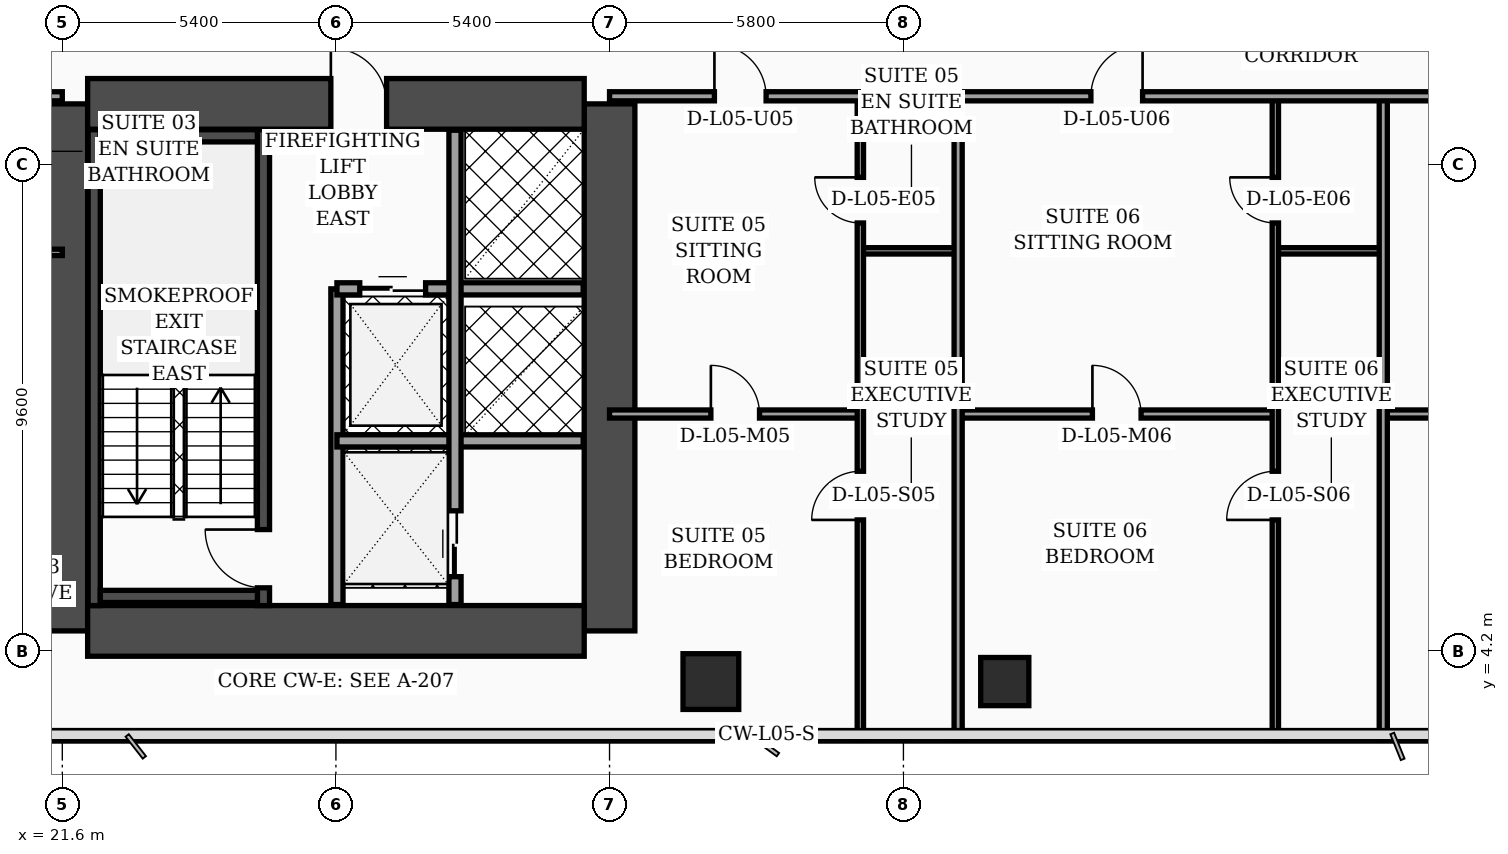
"""IFC4 building model, lengths in metres.
Left out: names, types, materials, properties, quantities, classifications, styles, units other than length and angle.
Written with IfcOpenShell. Run it as: python <this file> out.ifc"""

import sys

from ifc_helpers import new_model, si_unit, direction, frame, frame_2d, origin, origin_2d, place, context, subcontext, project, spatial, rectangle, hollow_rectangle, extrude, element, fill, save


model = new_model("IFC4")
c1 = context("Model", 3, precision=1e-05, world=origin(), true_north=direction((0.0, 1.0)))
c2 = subcontext(c1, "Body", "Model", "MODEL_VIEW")
j1 = project(units=[si_unit("LENGTHUNIT", "METRE"), si_unit("PLANEANGLEUNIT", "RADIAN")], contexts=[c1])
p1 = place(None, origin())
s1 = spatial("IfcSite", under=j1, at=p1, CompositionType="ELEMENT")
p2 = place(p1, origin())
s2 = spatial("IfcBuilding", under=s1, at=p2, CompositionType="ELEMENT")
p3 = place(p2, frame((0.0, 0.0, 27.0)))
s3 = spatial("IfcBuildingStorey", under=s2, at=p3, CompositionType="ELEMENT", Elevation=27.0)
for number, where, z_axis, x_axis in (
    (1, (21.6, 4.6, 0.0), (0.0, 0.0, 1.0), (0.0, 1.0, 0.0)),
    (2, (32.4, 4.6, 0.0), (0.0, 0.0, 1.0), (0.0, 1.0, 0.0)),
):
    element("IfcWall", number, at=place(p3, frame(where, z_axis=z_axis, x_axis=x_axis)), inside=s3, PredefinedType="SHEAR", context=c2, shape_type="SweptSolid", body=[
        extrude(rectangle(XDim=10.4, YDim=1.0, at=frame_2d((5.2, 0.0))), origin(), (0.0, 0.0, 1.0), 3.56),
    ])
p4 = place(p3, frame((22.1, 15.0, 0.0), z_axis=(0.0, 0.0, 1.0), x_axis=(1.0, 0.0, 0.0)))
e3 = element("IfcWall", 3, at=p4, inside=s3, PredefinedType="SHEAR", context=c2, shape_type="SweptSolid", body=[
    extrude(rectangle(XDim=9.8, YDim=1.0, at=frame_2d((4.9, 0.0))), origin(), (0.0, 0.0, 1.0), 3.56),
])
p5 = place(p4, frame((4.8, 0.0, 0.0)))
e4 = element("IfcOpeningElement", 4, at=p5, cuts=e3, PredefinedType="OPENING", context=c2, shape_type="SweptSolid", body=[
    extrude(rectangle(XDim=1.1, YDim=2.2, at=frame_2d((0.55, 1.1))), frame((0.0, 0.51, 0.0), z_axis=(0.0, -1.0, 0.0), x_axis=(1.0, 0.0, 0.0)), (0.0, 0.0, 1.0), 1.02),
])
p6 = place(p3, frame((22.1, 4.6, 0.0), z_axis=(0.0, 0.0, 1.0), x_axis=(1.0, 0.0, 0.0)))
e5 = element("IfcWall", 5, at=p6, inside=s3, PredefinedType="SHEAR", context=c2, shape_type="SweptSolid", body=[
    extrude(rectangle(XDim=9.8, YDim=1.0, at=frame_2d((4.9, 0.0))), origin(), (0.0, 0.0, 1.0), 3.56),
])
p7 = place(p3, frame((22.23, 5.1, 0.0), z_axis=(0.0, 0.0, 1.0), x_axis=(0.0, 1.0, 0.0)))
e6 = element("IfcWall", 6, at=p7, inside=s3, PredefinedType="SOLIDWALL", context=c2, shape_type="SweptSolid", body=[
    extrude(rectangle(XDim=9.39, YDim=0.24, at=frame_2d((4.695, 0.0))), origin(), (0.0, 0.0, 1.0), 3.56),
])
p8 = place(p3, frame((25.57, 5.1, 0.0), z_axis=(0.0, 0.0, 1.0), x_axis=(0.0, 1.0, 0.0)))
e7 = element("IfcWall", 7, at=p8, inside=s3, PredefinedType="SOLIDWALL", context=c2, shape_type="SweptSolid", body=[
    extrude(rectangle(XDim=9.39, YDim=0.24, at=frame_2d((4.695, 0.0))), origin(), (0.0, 0.0, 1.0), 3.56),
])
p9 = place(p8, frame((0.35, 0.0, 0.0)))
e8 = element("IfcOpeningElement", 8, at=p9, cuts=e7, PredefinedType="OPENING", context=c2, shape_type="SweptSolid", body=[
    extrude(rectangle(XDim=1.15, YDim=2.2, at=frame_2d((0.575, 1.1))), frame((0.0, 0.13, 0.0), z_axis=(0.0, -1.0, 0.0), x_axis=(1.0, 0.0, 0.0)), (0.0, 0.0, 1.0), 0.26),
])
for number, where, z_axis, x_axis in (
    (9, (22.35, 5.28, 0.0), (0.0, 0.0, 1.0), (1.0, 0.0, 0.0)),
    (10, (22.35, 14.37, 0.0), (0.0, 0.0, 1.0), (1.0, 0.0, 0.0)),
):
    element("IfcWall", number, at=place(p3, frame(where, z_axis=z_axis, x_axis=x_axis)), inside=s3, PredefinedType="SOLIDWALL", context=c2, shape_type="SweptSolid", body=[
        extrude(rectangle(XDim=3.1, YDim=0.24, at=frame_2d((1.55, 0.0))), origin(), (0.0, 0.0, 1.0), 3.56),
    ])
p10 = place(p3, frame((34.4, 3.6, 0.0), z_axis=(0.0, 0.0, 1.0), x_axis=(1.0, 0.0, 0.0)))
e11 = element("IfcColumn", 11, at=p10, inside=s3, PredefinedType="COLUMN", context=c2, shape_type="SweptSolid", body=[
    extrude(hollow_rectangle(XDim=1.1, YDim=1.1, WallThickness=0.045, at=origin_2d()), origin(), (0.0, 0.0, 1.0), 3.56),
])
p11 = place(p3, frame((40.2, 3.6, 0.0), z_axis=(0.0, 0.0, 1.0), x_axis=(1.0, 0.0, 0.0)))
e12 = element("IfcColumn", 12, at=p11, inside=s3, PredefinedType="COLUMN", context=c2, shape_type="SweptSolid", body=[
    extrude(hollow_rectangle(XDim=0.95, YDim=0.95, WallThickness=0.04, at=origin_2d()), origin(), (0.0, 0.0, 1.0), 3.56),
])
p12 = place(p3, frame((27.02, 5.12, 0.0), z_axis=(0.0, 0.0, 1.0), x_axis=(0.0, 1.0, 0.0)))
e13 = element("IfcWall", 13, at=p12, inside=s3, PredefinedType="SOLIDWALL", context=c2, shape_type="SweptSolid", body=[
    extrude(rectangle(XDim=6.23, YDim=0.24, at=frame_2d((3.115, 0.0))), origin(), (0.0, 0.0, 1.0), 3.56),
])
p13 = place(p3, frame((27.02, 11.35, 0.0), z_axis=(0.0, 0.0, 1.0), x_axis=(1.0, 0.0, 0.0)))
e14 = element("IfcWall", 14, at=p13, inside=s3, PredefinedType="SOLIDWALL", context=c2, shape_type="SweptSolid", body=[
    extrude(rectangle(XDim=4.86, YDim=0.24, at=frame_2d((2.43, 0.0))), origin(), (0.0, 0.0, 1.0), 3.56),
])
p14 = place(p13, frame((0.45, 0.0, 0.0)))
e15 = element("IfcOpeningElement", 15, at=p14, cuts=e14, PredefinedType="OPENING", context=c2, shape_type="SweptSolid", body=[
    extrude(rectangle(XDim=1.3, YDim=2.35, at=frame_2d((0.65, 1.175))), frame((0.0, 0.13, 0.0), z_axis=(0.0, -1.0, 0.0), x_axis=(1.0, 0.0, 0.0)), (0.0, 0.0, 1.0), 0.26),
])
p15 = place(p3, frame((27.02, 8.35, 0.0), z_axis=(0.0, 0.0, 1.0), x_axis=(1.0, 0.0, 0.0)))
e16 = element("IfcWall", 16, at=p15, inside=s3, PredefinedType="SOLIDWALL", context=c2, shape_type="SweptSolid", body=[
    extrude(rectangle(XDim=4.86, YDim=0.24, at=frame_2d((2.43, 0.0))), origin(), (0.0, 0.0, 1.0), 3.09),
])
p16 = place(p3, frame((29.35, 5.12, 0.0), z_axis=(0.0, 0.0, 1.0), x_axis=(0.0, 1.0, 0.0)))
e17 = element("IfcWall", 17, at=p16, inside=s3, PredefinedType="SOLIDWALL", context=c2, shape_type="SweptSolid", body=[
    extrude(rectangle(XDim=9.36, YDim=0.24, at=frame_2d((4.68, 0.0))), origin(), (0.0, 0.0, 1.0), 3.56),
])
p17 = place(p16, frame((0.55, 0.0, 0.0)))
e18 = element("IfcOpeningElement", 18, at=p17, cuts=e17, PredefinedType="OPENING", context=c2, shape_type="SweptSolid", body=[
    extrude(rectangle(XDim=1.3, YDim=2.35, at=frame_2d((0.65, 1.175))), frame((0.0, 0.13, 0.0), z_axis=(0.0, -1.0, 0.0), x_axis=(1.0, 0.0, 0.0)), (0.0, 0.0, 1.0), 0.26),
])
p18 = place(p3, frame((19.6, 12.07, 0.0), z_axis=(0.0, 0.0, 1.0), x_axis=(1.0, 0.0, 0.0)))
e19 = element("IfcWall", 19, at=p18, inside=s3, PredefinedType="PARTITIONING", context=c2, shape_type="SweptSolid", body=[
    extrude(rectangle(XDim=2.0, YDim=0.125, at=frame_2d((1.0, 0.0))), origin(), (0.0, 0.0, 1.0), 3.56),
])
p19 = place(p3, frame((15.15, 15.15, 0.0), z_axis=(0.0, 0.0, 1.0), x_axis=(1.0, 0.0, 0.0)))
e20 = element("IfcWall", 20, at=p19, inside=s3, PredefinedType="PARTITIONING", context=c2, shape_type="SweptSolid", body=[
    extrude(rectangle(XDim=6.45, YDim=0.18, at=frame_2d((3.225, 0.0))), origin(), (0.0, 0.0, 1.0), 2.34),
])
p20 = place(p19, frame((1.74, 0.0, 0.0)))
e21 = element("IfcOpeningElement", 21, at=p20, cuts=e20, PredefinedType="OPENING", context=c2, shape_type="SweptSolid", body=[
    extrude(rectangle(XDim=1.02, YDim=2.2, at=frame_2d((0.51, 1.1))), frame((0.0, 0.1, 0.0), z_axis=(0.0, -1.0, 0.0), x_axis=(1.0, 0.0, 0.0)), (0.0, 0.0, 1.0), 0.2),
])
p21 = place(p3, frame((37.35, 12.1, 0.0), z_axis=(0.0, 0.0, 1.0), x_axis=(1.0, 0.0, 0.0)))
e22 = element("IfcWall", 22, at=p21, inside=s3, PredefinedType="PARTITIONING", context=c2, shape_type="SweptSolid", body=[
    extrude(rectangle(XDim=1.93, YDim=0.125, at=frame_2d((0.965, 0.0))), origin(), (0.0, 0.0, 1.0), 3.56),
])
p22 = place(p3, frame((32.4, 8.88, 0.0), z_axis=(0.0, 0.0, 1.0), x_axis=(1.0, 0.0, 0.0)))
e23 = element("IfcWall", 23, at=p22, inside=s3, PredefinedType="PARTITIONING", context=c2, shape_type="SweptSolid", body=[
    extrude(rectangle(XDim=4.95, YDim=0.16, at=frame_2d((2.475, 0.0))), origin(), (0.0, 0.0, 1.0), 2.84),
])
p23 = place(p22, frame((2.0, 0.0, 0.0)))
e24 = element("IfcOpeningElement", 24, at=p23, cuts=e23, PredefinedType="OPENING", context=c2, shape_type="SweptSolid", body=[
    extrude(rectangle(XDim=0.96, YDim=2.2, at=frame_2d((0.48, 1.1))), frame((0.0, 0.09, 0.0), z_axis=(0.0, -1.0, 0.0), x_axis=(1.0, 0.0, 0.0)), (0.0, 0.0, 1.0), 0.18),
])
p24 = place(p3, frame((37.35, 2.44, 0.0), z_axis=(0.0, 0.0, 1.0), x_axis=(0.0, 1.0, 0.0)))
e25 = element("IfcWall", 25, at=p24, inside=s3, PredefinedType="PARTITIONING", context=c2, shape_type="SweptSolid", body=[
    extrude(rectangle(XDim=12.71, YDim=0.125, at=frame_2d((6.355, 0.0))), origin(), (0.0, 0.0, 1.0), 2.84),
])
p25 = place(p24, frame((4.35, 0.0, 0.0)))
e26 = element("IfcOpeningElement", 26, at=p25, cuts=e25, PredefinedType="OPENING", context=c2, shape_type="SweptSolid", body=[
    extrude(rectangle(XDim=0.96, YDim=2.2, at=frame_2d((0.48, 1.1))), frame((0.0, 0.073, 0.0), z_axis=(0.0, -1.0, 0.0), x_axis=(1.0, 0.0, 0.0)), (0.0, 0.0, 1.0), 0.145),
])
p26 = place(p24, frame((10.21, 0.0, 0.0)))
e27 = element("IfcOpeningElement", 27, at=p26, cuts=e25, PredefinedType="OPENING", context=c2, shape_type="SweptSolid", body=[
    extrude(rectangle(XDim=0.9, YDim=2.15, at=frame_2d((0.45, 1.075))), frame((0.0, 0.073, 0.0), z_axis=(0.0, -1.0, 0.0), x_axis=(1.0, 0.0, 0.0)), (0.0, 0.0, 1.0), 0.145),
])
p27 = place(p3, frame((45.54, 12.1, 0.0), z_axis=(0.0, 0.0, 1.0), x_axis=(1.0, 0.0, 0.0)))
e28 = element("IfcWall", 28, at=p27, inside=s3, PredefinedType="PARTITIONING", context=c2, shape_type="SweptSolid", body=[
    extrude(rectangle(XDim=2.13, YDim=0.125, at=frame_2d((1.065, 0.0))), origin(), (0.0, 0.0, 1.0), 2.84),
])
p28 = place(p3, frame((39.28, 8.88, 0.0), z_axis=(0.0, 0.0, 1.0), x_axis=(1.0, 0.0, 0.0)))
e29 = element("IfcWall", 29, at=p28, inside=s3, PredefinedType="PARTITIONING", context=c2, shape_type="SweptSolid", body=[
    extrude(rectangle(XDim=6.26, YDim=0.16, at=frame_2d((3.13, 0.0))), origin(), (0.0, 0.0, 1.0), 3.09),
])
p29 = place(p28, frame((2.65, 0.0, 0.0)))
e30 = element("IfcOpeningElement", 30, at=p29, cuts=e29, PredefinedType="OPENING", context=c2, shape_type="SweptSolid", body=[
    extrude(rectangle(XDim=0.96, YDim=2.2, at=frame_2d((0.48, 1.1))), frame((0.0, 0.09, 0.0), z_axis=(0.0, -1.0, 0.0), x_axis=(1.0, 0.0, 0.0)), (0.0, 0.0, 1.0), 0.18),
])
p30 = place(p3, frame((45.54, 2.44, 0.0), z_axis=(0.0, 0.0, 1.0), x_axis=(0.0, 1.0, 0.0)))
e31 = element("IfcWall", 31, at=p30, inside=s3, PredefinedType="PARTITIONING", context=c2, shape_type="SweptSolid", body=[
    extrude(rectangle(XDim=12.71, YDim=0.125, at=frame_2d((6.355, 0.0))), origin(), (0.0, 0.0, 1.0), 3.04),
])
p31 = place(p30, frame((4.35, 0.0, 0.0)))
e32 = element("IfcOpeningElement", 32, at=p31, cuts=e31, PredefinedType="OPENING", context=c2, shape_type="SweptSolid", body=[
    extrude(rectangle(XDim=0.96, YDim=2.2, at=frame_2d((0.48, 1.1))), frame((0.0, 0.073, 0.0), z_axis=(0.0, -1.0, 0.0), x_axis=(1.0, 0.0, 0.0)), (0.0, 0.0, 1.0), 0.145),
])
p32 = place(p30, frame((10.21, 0.0, 0.0)))
e33 = element("IfcOpeningElement", 33, at=p32, cuts=e31, PredefinedType="OPENING", context=c2, shape_type="SweptSolid", body=[
    extrude(rectangle(XDim=0.9, YDim=2.15, at=frame_2d((0.45, 1.075))), frame((0.0, 0.073, 0.0), z_axis=(0.0, -1.0, 0.0), x_axis=(1.0, 0.0, 0.0)), (0.0, 0.0, 1.0), 0.145),
])
p33 = place(p3, frame((39.28, 2.44, 0.0), z_axis=(0.0, 0.0, 1.0), x_axis=(0.0, 1.0, 0.0)))
e34 = element("IfcWall", 34, at=p33, inside=s3, PredefinedType="PARTITIONING", context=c2, shape_type="SweptSolid", body=[
    extrude(rectangle(XDim=12.71, YDim=0.16, at=frame_2d((6.355, 0.0))), origin(), (0.0, 0.0, 1.0), 2.84),
])
p34 = place(p3, frame((47.67, 8.88, 0.0), z_axis=(0.0, 0.0, 1.0), x_axis=(1.0, 0.0, 0.0)))
e35 = element("IfcWall", 35, at=p34, inside=s3, PredefinedType="PARTITIONING", context=c2, shape_type="SweptSolid", body=[
    extrude(rectangle(XDim=5.4, YDim=0.16, at=frame_2d((2.7, 0.0))), origin(), (0.0, 0.0, 1.0), 2.84),
])
p35 = place(p34, frame((2.22, 0.0, 0.0)))
e36 = element("IfcOpeningElement", 36, at=p35, cuts=e35, PredefinedType="OPENING", context=c2, shape_type="SweptSolid", body=[
    extrude(rectangle(XDim=0.96, YDim=2.2, at=frame_2d((0.48, 1.1))), frame((0.0, 0.09, 0.0), z_axis=(0.0, -1.0, 0.0), x_axis=(1.0, 0.0, 0.0)), (0.0, 0.0, 1.0), 0.18),
])
p36 = place(p3, frame((47.67, 2.44, 0.0), z_axis=(0.0, 0.0, 1.0), x_axis=(0.0, 1.0, 0.0)))
e37 = element("IfcWall", 37, at=p36, inside=s3, PredefinedType="PARTITIONING", context=c2, shape_type="SweptSolid", body=[
    extrude(rectangle(XDim=12.71, YDim=0.16, at=frame_2d((6.355, 0.0))), origin(), (0.0, 0.0, 1.0), 2.84),
])
p37 = place(p3, frame((32.4, 15.15, 0.0), z_axis=(0.0, 0.0, 1.0), x_axis=(1.0, 0.0, 0.0)))
e38 = element("IfcWall", 38, at=p37, inside=s3, PredefinedType="PARTITIONING", context=c2, shape_type="SweptSolid", body=[
    extrude(rectangle(XDim=22.8, YDim=0.18, at=frame_2d((11.4, 0.0))), origin(), (0.0, 0.0, 1.0), 2.84),
])
p38 = place(p37, frame((2.07, 0.0, 0.0)))
e39 = element("IfcOpeningElement", 39, at=p38, cuts=e38, PredefinedType="OPENING", context=c2, shape_type="SweptSolid", body=[
    extrude(rectangle(XDim=1.02, YDim=2.2, at=frame_2d((0.51, 1.1))), frame((0.0, 0.1, 0.0), z_axis=(0.0, -1.0, 0.0), x_axis=(1.0, 0.0, 0.0)), (0.0, 0.0, 1.0), 0.2),
])
p39 = place(p37, frame((9.5, 0.0, 0.0)))
e40 = element("IfcOpeningElement", 40, at=p39, cuts=e38, PredefinedType="OPENING", context=c2, shape_type="SweptSolid", body=[
    extrude(rectangle(XDim=1.02, YDim=2.2, at=frame_2d((0.51, 1.1))), frame((0.0, 0.1, 0.0), z_axis=(0.0, -1.0, 0.0), x_axis=(1.0, 0.0, 0.0)), (0.0, 0.0, 1.0), 0.2),
])
p40 = place(p37, frame((17.46, 0.0, 0.0)))
e41 = element("IfcOpeningElement", 41, at=p40, cuts=e38, PredefinedType="OPENING", context=c2, shape_type="SweptSolid", body=[
    extrude(rectangle(XDim=1.02, YDim=2.2, at=frame_2d((0.51, 1.1))), frame((0.0, 0.1, 0.0), z_axis=(0.0, -1.0, 0.0), x_axis=(1.0, 0.0, 0.0)), (0.0, 0.0, 1.0), 0.2),
])
p41 = place(p14, origin())
e42 = element("IfcDoor", 42, at=p41, inside=s3, OperationType="DOUBLE_DOOR_SLIDING", PredefinedType="DOOR", context=c2, shape_type="SweptSolid", body=[
    extrude(rectangle(XDim=1.3, YDim=2.35, at=frame_2d((0.65, 1.175))), frame((0.0, 0.025, 0.0), z_axis=(0.0, -1.0, 0.0), x_axis=(1.0, 0.0, 0.0)), (0.0, 0.0, 1.0), 0.05),
])
fill(e15, e42)
p42 = place(p17, origin())
e43 = element("IfcDoor", 43, at=p42, inside=s3, OperationType="DOUBLE_DOOR_SLIDING", PredefinedType="DOOR", context=c2, shape_type="SweptSolid", body=[
    extrude(rectangle(XDim=1.3, YDim=2.35, at=frame_2d((0.65, 1.175))), frame((0.0, 0.025, 0.0), z_axis=(0.0, -1.0, 0.0), x_axis=(1.0, 0.0, 0.0)), (0.0, 0.0, 1.0), 0.05),
])
fill(e18, e43)
p43 = place(p23, origin())
e44 = element("IfcDoor", 44, at=p43, inside=s3, OperationType="SINGLE_SWING_LEFT", PredefinedType="DOOR", context=c2, shape_type="SweptSolid", body=[
    extrude(rectangle(XDim=0.96, YDim=2.2, at=frame_2d((0.48, 1.1))), frame((0.0, 0.025, 0.0), z_axis=(0.0, -1.0, 0.0), x_axis=(1.0, 0.0, 0.0)), (0.0, 0.0, 1.0), 0.05),
])
fill(e24, e44)
p44 = place(p25, origin())
e45 = element("IfcDoor", 45, at=p44, inside=s3, OperationType="SINGLE_SWING_LEFT", PredefinedType="DOOR", context=c2, shape_type="SweptSolid", body=[
    extrude(rectangle(XDim=0.96, YDim=2.2, at=frame_2d((0.48, 1.1))), frame((0.0, 0.025, 0.0), z_axis=(0.0, -1.0, 0.0), x_axis=(1.0, 0.0, 0.0)), (0.0, 0.0, 1.0), 0.05),
])
fill(e26, e45)
p45 = place(p26, origin())
e46 = element("IfcDoor", 46, at=p45, inside=s3, OperationType="SINGLE_SWING_RIGHT", PredefinedType="DOOR", context=c2, shape_type="SweptSolid", body=[
    extrude(rectangle(XDim=0.9, YDim=2.15, at=frame_2d((0.45, 1.075))), frame((0.0, 0.025, 0.0), z_axis=(0.0, -1.0, 0.0), x_axis=(1.0, 0.0, 0.0)), (0.0, 0.0, 1.0), 0.05),
])
fill(e27, e46)
p46 = place(p29, origin())
e47 = element("IfcDoor", 47, at=p46, inside=s3, OperationType="SINGLE_SWING_LEFT", PredefinedType="DOOR", context=c2, shape_type="SweptSolid", body=[
    extrude(rectangle(XDim=0.96, YDim=2.2, at=frame_2d((0.48, 1.1))), frame((0.0, 0.025, 0.0), z_axis=(0.0, -1.0, 0.0), x_axis=(1.0, 0.0, 0.0)), (0.0, 0.0, 1.0), 0.05),
])
fill(e30, e47)
p47 = place(p31, origin())
e48 = element("IfcDoor", 48, at=p47, inside=s3, OperationType="SINGLE_SWING_LEFT", PredefinedType="DOOR", context=c2, shape_type="SweptSolid", body=[
    extrude(rectangle(XDim=0.96, YDim=2.2, at=frame_2d((0.48, 1.1))), frame((0.0, 0.025, 0.0), z_axis=(0.0, -1.0, 0.0), x_axis=(1.0, 0.0, 0.0)), (0.0, 0.0, 1.0), 0.05),
])
fill(e32, e48)
p48 = place(p32, origin())
e49 = element("IfcDoor", 49, at=p48, inside=s3, OperationType="SINGLE_SWING_RIGHT", PredefinedType="DOOR", context=c2, shape_type="SweptSolid", body=[
    extrude(rectangle(XDim=0.9, YDim=2.15, at=frame_2d((0.45, 1.075))), frame((0.0, 0.025, 0.0), z_axis=(0.0, -1.0, 0.0), x_axis=(1.0, 0.0, 0.0)), (0.0, 0.0, 1.0), 0.05),
])
fill(e33, e49)
p49 = place(p38, origin())
e50 = element("IfcDoor", 50, at=p49, inside=s3, OperationType="SINGLE_SWING_LEFT", PredefinedType="DOOR", context=c2, shape_type="SweptSolid", body=[
    extrude(rectangle(XDim=1.02, YDim=2.2, at=frame_2d((0.51, 1.1))), frame((0.0, 0.025, 0.0), z_axis=(0.0, -1.0, 0.0), x_axis=(1.0, 0.0, 0.0)), (0.0, 0.0, 1.0), 0.05),
])
fill(e39, e50)
p50 = place(p39, origin())
e51 = element("IfcDoor", 51, at=p50, inside=s3, OperationType="SINGLE_SWING_RIGHT", PredefinedType="DOOR", context=c2, shape_type="SweptSolid", body=[
    extrude(rectangle(XDim=1.02, YDim=2.2, at=frame_2d((0.51, 1.1))), frame((0.0, 0.025, 0.0), z_axis=(0.0, -1.0, 0.0), x_axis=(1.0, 0.0, 0.0)), (0.0, 0.0, 1.0), 0.05),
])
fill(e40, e51)
p51 = place(p9, origin())
e52 = element("IfcDoor", 52, at=p51, inside=s3, OperationType="SINGLE_SWING_RIGHT", PredefinedType="DOOR", context=c2, shape_type="SweptSolid", body=[
    extrude(rectangle(XDim=1.15, YDim=2.2, at=frame_2d((0.575, 1.1))), frame((0.0, 0.025, 0.0), z_axis=(0.0, -1.0, 0.0), x_axis=(1.0, 0.0, 0.0)), (0.0, 0.0, 1.0), 0.05),
])
fill(e8, e52)
p52 = place(p5, origin())
e53 = element("IfcDoor", 53, at=p52, inside=s3, OperationType="SINGLE_SWING_LEFT", PredefinedType="DOOR", context=c2, shape_type="SweptSolid", body=[
    extrude(rectangle(XDim=1.1, YDim=2.2, at=frame_2d((0.55, 1.1))), frame((0.0, 0.025, 0.0), z_axis=(0.0, -1.0, 0.0), x_axis=(1.0, 0.0, 0.0)), (0.0, 0.0, 1.0), 0.05),
])
fill(e4, e53)
save(model, sys.argv[1])
